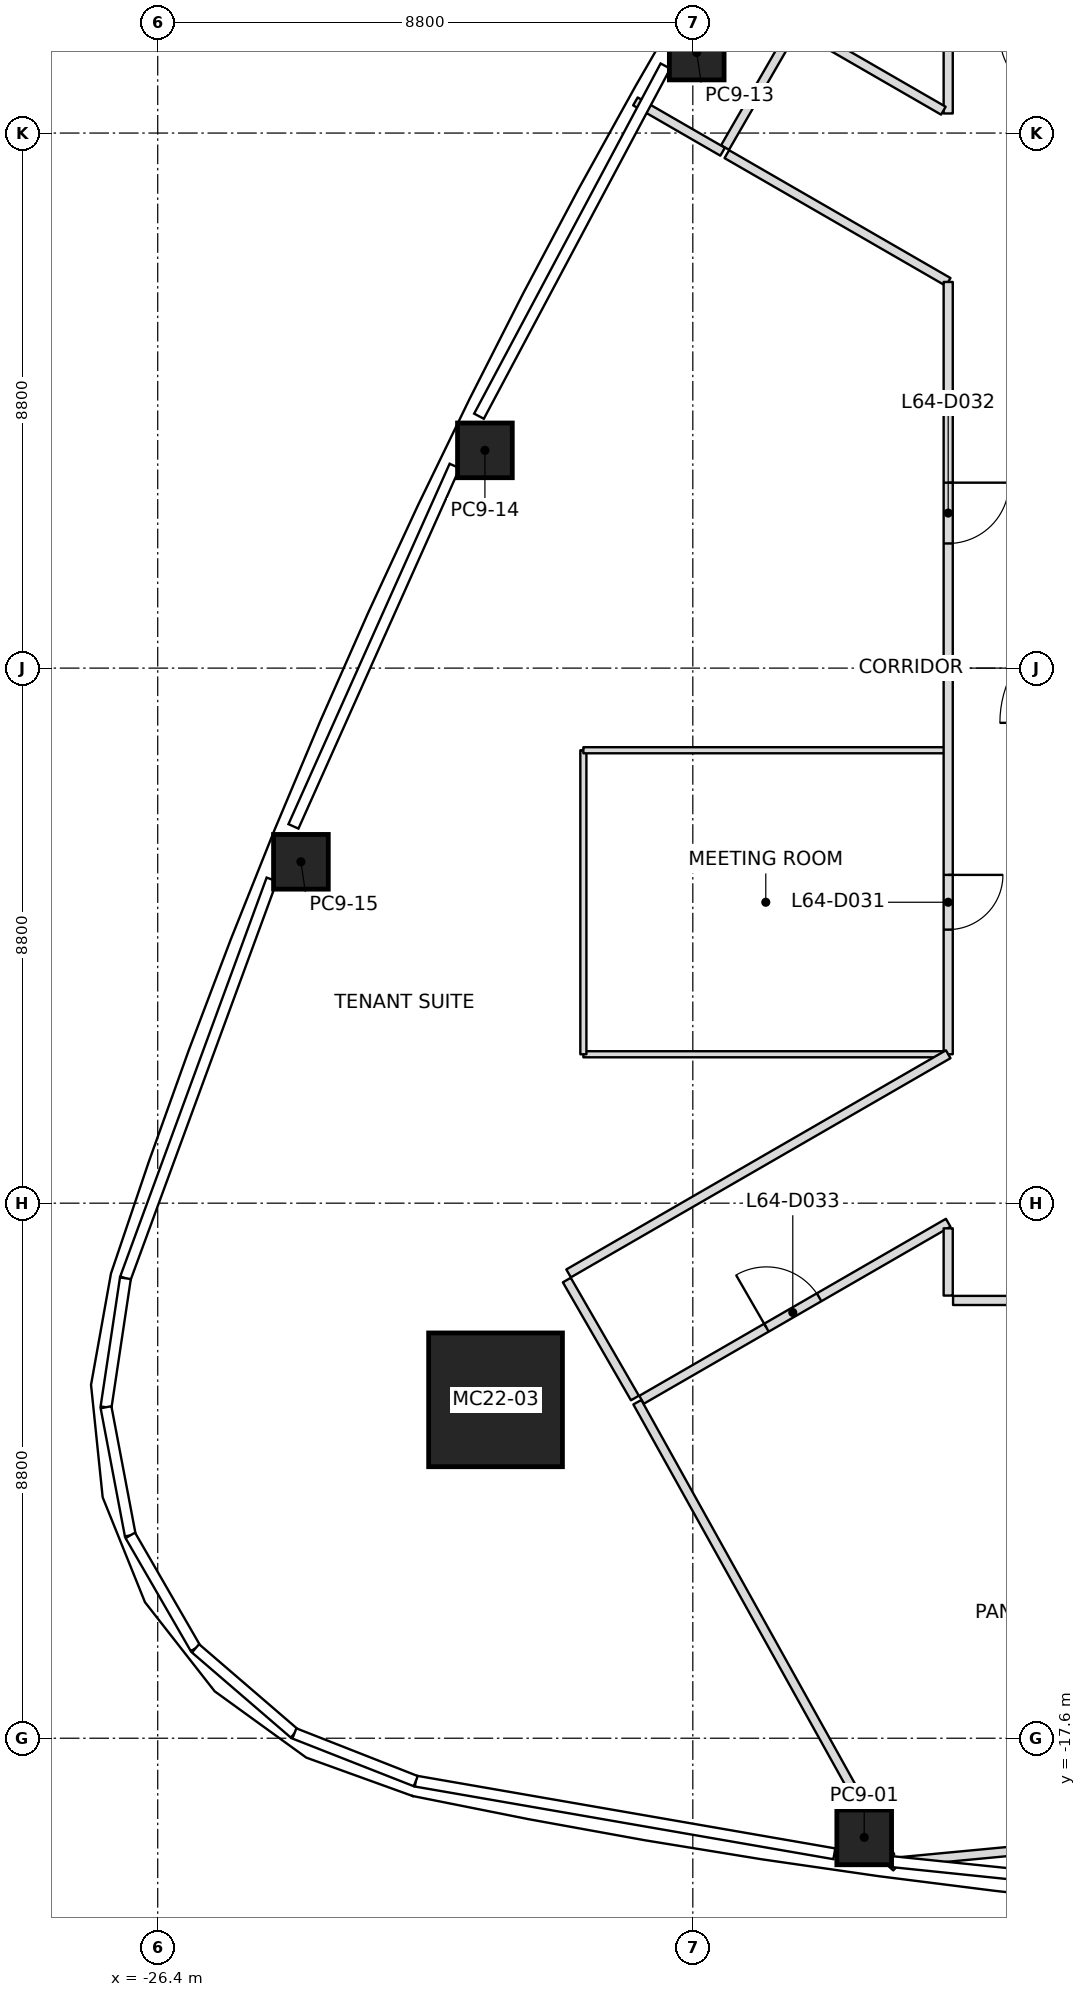
"""IFC4 building model, lengths in metres.
Left out: names, types, materials, properties, quantities, classifications, styles, units other than length and angle.
Written with IfcOpenShell. Run it as: python <this file> out.ifc"""

import sys

from ifc_helpers import new_model, si_unit, direction, frame, frame_2d, origin, origin_2d, place, context, subcontext, project, spatial, rectangle, extrude, element, fill, save


model = new_model("IFC4")
c1 = context("Model", 3, precision=1e-05, world=origin(), true_north=direction((0.0, 1.0)))
c2 = subcontext(c1, "Body", "Model", "MODEL_VIEW")
j1 = project(units=[si_unit("LENGTHUNIT", "METRE"), si_unit("PLANEANGLEUNIT", "RADIAN")], contexts=[c1])
p1 = place(None, origin())
s1 = spatial("IfcSite", under=j1, at=p1, CompositionType="ELEMENT")
p2 = place(p1, origin())
s2 = spatial("IfcBuilding", under=s1, at=p2, CompositionType="ELEMENT")
p3 = place(p2, frame((0.0, 0.0, 283.0)))
s3 = spatial("IfcBuildingStorey", under=s2, at=p3, CompositionType="ELEMENT", Elevation=283.0)
p4 = place(p3, frame((-20.844, -12.034, 0.0), z_axis=(0.027756720281, 0.01604399436, 0.999485945236), x_axis=(0.999614708015, -0.000445500311, -0.027753144871)))
e1 = element("IfcColumn", 1, at=p4, inside=s3, PredefinedType="COLUMN", context=c2, shape_type="SweptSolid", body=[
    extrude(rectangle(XDim=2.2, YDim=2.2, at=origin_2d()), origin(), (0.0, 0.0, 1.0), 4.002),
])
p5 = place(p3, frame((-14.781, -19.231, 0.0), z_axis=(0.017452445502, 0.010434853779, 0.999793241612), x_axis=(-0.990413210435, 0.137223335577, 0.015856505603)))
e2 = element("IfcColumn", 2, at=p5, inside=s3, PredefinedType="COLUMN", context=c2, shape_type="SweptSolid", body=[
    extrude(rectangle(XDim=0.9, YDim=0.9, at=origin_2d()), origin(), (0.0, 0.0, 1.0), 4.001),
])
p6 = place(p3, frame((-17.536, 10.124, 0.0), z_axis=(0.009948074445, -0.005736926367, 0.999934059571), x_axis=(0.499975258342, 0.8660396879, -5.385525e-06)))
e3 = element("IfcColumn", 3, at=p6, inside=s3, PredefinedType="COLUMN", context=c2, shape_type="SweptSolid", body=[
    extrude(rectangle(XDim=0.9, YDim=0.9, at=origin_2d()), origin(), (0.0, 0.0, 1.0), 4.0),
])
p7 = place(p3, frame((-21.019, 3.581, 0.0), z_axis=(0.014036674448, 0.002013957638, 0.999899452818), x_axis=(0.43929078876, 0.898309514635, -0.007976141077)))
e4 = element("IfcColumn", 4, at=p7, inside=s3, PredefinedType="COLUMN", context=c2, shape_type="SweptSolid", body=[
    extrude(rectangle(XDim=0.9, YDim=0.9, at=origin_2d()), origin(), (0.0, 0.0, 1.0), 4.0),
])
p8 = place(p3, frame((-24.045, -3.186, 0.0), z_axis=(0.017757551143, 0.009946669541, 0.999792845115), x_axis=(0.376533551253, 0.92626647535, -0.015902874689)))
e5 = element("IfcColumn", 5, at=p8, inside=s3, PredefinedType="COLUMN", context=c2, shape_type="SweptSolid", body=[
    extrude(rectangle(XDim=0.9, YDim=0.9, at=origin_2d()), origin(), (0.0, 0.0, 1.0), 4.001),
])
p9 = place(p3, frame((-18.512, -12.074, 0.0), z_axis=(0.0, 0.0, 1.0), x_axis=(0.486357878063, -0.873759700631, 0.0)))
e6 = element("IfcWall", 6, at=p9, inside=s3, PredefinedType="PARTITIONING", context=c2, shape_type="SweptSolid", body=[
    extrude(rectangle(XDim=8.551, YDim=0.15, at=frame_2d((4.276, 0.0))), origin(), (0.0, 0.0, 1.0), 3.45),
])
p10 = place(p3, frame((-17.11, 8.493, 0.0), z_axis=(0.0, 0.0, 1.0), x_axis=(-0.86604809764, 0.499960691028, 0.0)))
e7 = element("IfcWall", 7, at=p10, inside=s3, PredefinedType="PARTITIONING", context=c2, shape_type="SweptSolid", body=[
    extrude(rectangle(XDim=1.656, YDim=0.15, at=frame_2d((0.828, 0.0))), origin(), (0.0, 0.0, 1.0), 3.234),
])
p11 = place(p3, frame((-8.2, -19.064, 0.0), z_axis=(0.0, 0.0, 1.0), x_axis=(-0.995555683818, -0.09417473344, 0.0)))
e8 = element("IfcWall", 8, at=p11, inside=s3, PredefinedType="PARTITIONING", context=c2, shape_type="SweptSolid", body=[
    extrude(rectangle(XDim=6.03, YDim=0.15, at=frame_2d((3.015, 0.0))), origin(), (0.0, 0.0, 1.0), 3.234),
])
p12 = place(p3, frame((-14.253, -19.719, 0.0), z_axis=(0.0, 0.0, 1.0), x_axis=(-0.743357981466, 0.668893796794, 0.0)))
e9 = element("IfcWall", 9, at=p12, inside=s3, PredefinedType="PARTITIONING", context=c2, shape_type="SweptSolid", body=[
    extrude(rectangle(XDim=0.19, YDim=0.15, at=frame_2d((0.095, 0.0))), origin(), (0.0, 0.0, 1.0), 3.45),
])
p13 = place(p3, frame((-19.672, -10.064, 0.0), z_axis=(0.0, 0.0, 1.0), x_axis=(0.500030632641, -0.866007717299, 0.0)))
e10 = element("IfcWall", 10, at=p13, inside=s3, PredefinedType="PARTITIONING", context=c2, shape_type="SweptSolid", body=[
    extrude(rectangle(XDim=2.24, YDim=0.15, at=frame_2d((1.12, 0.0))), origin(), (0.0, 0.0, 1.0), 3.233),
])
p14 = place(p3, frame((-17.041, 8.453, 0.0), z_axis=(0.0, 0.0, 1.0), x_axis=(0.866026021477, -0.499998930123, 0.0)))
e11 = element("IfcWall", 11, at=p14, inside=s3, PredefinedType="PARTITIONING", context=c2, shape_type="SweptSolid", body=[
    extrude(rectangle(XDim=4.204, YDim=0.15, at=frame_2d((2.102, 0.0))), origin(), (0.0, 0.0, 1.0), 3.45),
])
p15 = place(p3, frame((-13.4, 6.351, 0.0), z_axis=(0.0, 0.0, 1.0), x_axis=(0.0, -1.0, 0.0)))
e12 = element("IfcWall", 12, at=p15, inside=s3, PredefinedType="PARTITIONING", context=c2, shape_type="SweptSolid", body=[
    extrude(rectangle(XDim=12.702, YDim=0.15, at=frame_2d((6.351, 0.0))), origin(), (0.0, 0.0, 1.0), 3.317),
])
p16 = place(p15, frame((9.752, 0.0, 0.0)))
e13 = element("IfcOpeningElement", 13, at=p16, cuts=e12, PredefinedType="OPENING", context=c2, shape_type="SweptSolid", body=[
    extrude(rectangle(XDim=0.9, YDim=2.1, at=frame_2d((0.45, 1.05))), frame((0.0, 0.075, 0.0), z_axis=(0.0, -1.0, 0.0), x_axis=(1.0, 0.0, 0.0)), (0.0, 0.0, 1.0), 0.15),
])
p17 = place(p15, frame((3.301, 0.0, 0.0)))
e14 = element("IfcOpeningElement", 14, at=p17, cuts=e12, PredefinedType="OPENING", context=c2, shape_type="SweptSolid", body=[
    extrude(rectangle(XDim=1.0, YDim=2.1, at=frame_2d((0.5, 1.05))), frame((0.0, 0.075, 0.0), z_axis=(0.0, -1.0, 0.0), x_axis=(1.0, 0.0, 0.0)), (0.0, 0.0, 1.0), 0.15),
])
p18 = place(p3, frame((-13.4, -6.351, 0.0), z_axis=(0.0, 0.0, 1.0), x_axis=(-0.866040084029, -0.499974572209, 0.0)))
e15 = element("IfcWall", 15, at=p18, inside=s3, PredefinedType="PARTITIONING", context=c2, shape_type="SweptSolid", body=[
    extrude(rectangle(XDim=7.209, YDim=0.15, at=frame_2d((3.604, 0.0))), origin(), (0.0, 0.0, 1.0), 3.317),
])
p19 = place(p3, frame((-18.443, -12.034, 0.0), z_axis=(0.0, 0.0, 1.0), x_axis=(0.866031294818, 0.499989796292, 0.0)))
e16 = element("IfcWall", 16, at=p19, inside=s3, PredefinedType="PARTITIONING", context=c2, shape_type="SweptSolid", body=[
    extrude(rectangle(XDim=5.823, YDim=0.15, at=frame_2d((2.912, 0.0))), origin(), (0.0, 0.0, 1.0), 3.233),
])
p20 = place(p19, frame((2.372, 0.0, 0.0)))
e17 = element("IfcOpeningElement", 17, at=p20, cuts=e16, PredefinedType="OPENING", context=c2, shape_type="SweptSolid", body=[
    extrude(rectangle(XDim=1.0, YDim=2.1, at=frame_2d((0.5, 1.05))), frame((0.0, 0.075, 0.0), z_axis=(0.0, -1.0, 0.0), x_axis=(1.0, 0.0, 0.0)), (0.0, 0.0, 1.0), 0.15),
])
p21 = place(p3, frame((-13.4, -9.214, 0.0), z_axis=(0.0, 0.0, 1.0), x_axis=(0.0, -1.0, 0.0)))
e18 = element("IfcWall", 18, at=p21, inside=s3, PredefinedType="PARTITIONING", context=c2, shape_type="SweptSolid", body=[
    extrude(rectangle(XDim=1.106, YDim=0.15, at=frame_2d((0.553, 0.0))), origin(), (0.0, 0.0, 1.0), 3.233),
])
p22 = place(p3, frame((-15.95, 10.502, 0.0), z_axis=(0.0, 0.0, 1.0), x_axis=(-0.49994888933, -0.866054910533, 0.0)))
e19 = element("IfcWall", 19, at=p22, inside=s3, PredefinedType="PARTITIONING", context=c2, shape_type="SweptSolid", body=[
    extrude(rectangle(XDim=2.24, YDim=0.15, at=frame_2d((1.12, 0.0))), origin(), (0.0, 0.0, 1.0), 3.45),
])
p23 = place(p3, frame((-13.4, 10.32, 0.0), z_axis=(0.0, 0.0, 1.0), x_axis=(0.0, -1.0, 0.0)))
e20 = element("IfcWall", 20, at=p23, inside=s3, PredefinedType="PARTITIONING", context=c2, shape_type="SweptSolid", body=[
    extrude(rectangle(XDim=1.198, YDim=0.15, at=frame_2d((0.599, 0.0))), origin(), (0.0, 0.0, 1.0), 3.45),
])
p24 = place(p3, frame((-13.479, 9.168, 0.0), z_axis=(0.0, 0.0, 1.0), x_axis=(-0.866052895615, 0.499952379729, 0.0)))
e21 = element("IfcWall", 21, at=p24, inside=s3, PredefinedType="PARTITIONING", context=c2, shape_type="SweptSolid", body=[
    extrude(rectangle(XDim=2.727, YDim=0.15, at=frame_2d((1.363, 0.0))), origin(), (0.0, 0.0, 1.0), 3.45),
])
p25 = place(p3, frame((-13.32, -10.4, 0.0), z_axis=(0.0, 0.0, 1.0), x_axis=(1.0, 0.0, 0.0)))
e22 = element("IfcWall", 22, at=p25, inside=s3, PredefinedType="PARTITIONING", context=c2, shape_type="SweptSolid", body=[
    extrude(rectangle(XDim=12.12, YDim=0.15, at=frame_2d((6.06, 0.0))), origin(), (0.0, 0.0, 1.0), 3.393),
])
p26 = place(p3, frame((-13.46, -6.351, 0.0), z_axis=(0.0, 0.0, 1.0), x_axis=(-1.0, 0.0, 0.0)))
e23 = element("IfcWall", 23, at=p26, inside=s3, PredefinedType="PARTITIONING", context=c2, shape_type="SweptSolid", body=[
    extrude(rectangle(XDim=5.94, YDim=0.1, at=frame_2d((2.97, 0.0))), origin(), (0.0, 0.0, 1.0), 3.317),
])
p27 = place(p3, frame((-19.4, -6.351, 0.0), z_axis=(0.0, 0.0, 1.0), x_axis=(0.0, 1.0, 0.0)))
e24 = element("IfcWall", 24, at=p27, inside=s3, PredefinedType="PARTITIONING", context=c2, shape_type="SweptSolid", body=[
    extrude(rectangle(XDim=5.0, YDim=0.1, at=frame_2d((2.5, 0.0))), origin(), (0.0, 0.0, 1.0), 3.317),
])
p28 = place(p3, frame((-19.4, -1.351, 0.0), z_axis=(0.0, 0.0, 1.0), x_axis=(1.0, 0.0, 0.0)))
e25 = element("IfcWall", 25, at=p28, inside=s3, PredefinedType="PARTITIONING", context=c2, shape_type="SweptSolid", body=[
    extrude(rectangle(XDim=5.97, YDim=0.1, at=frame_2d((2.985, 0.0))), origin(), (0.0, 0.0, 1.0), 3.317),
])
p29 = place(p16, origin())
e26 = element("IfcDoor", 26, at=p29, inside=s3, OperationType="SINGLE_SWING_LEFT", PredefinedType="DOOR", context=c2, shape_type="SweptSolid", body=[
    extrude(rectangle(XDim=0.9, YDim=2.1, at=frame_2d((0.45, 1.05))), frame((0.0, 0.025, 0.0), z_axis=(0.0, -1.0, 0.0), x_axis=(1.0, 0.0, 0.0)), (0.0, 0.0, 1.0), 0.05),
])
fill(e13, e26)
p30 = place(p17, origin())
e27 = element("IfcDoor", 27, at=p30, inside=s3, OperationType="SINGLE_SWING_RIGHT", PredefinedType="DOOR", context=c2, shape_type="SweptSolid", body=[
    extrude(rectangle(XDim=1.0, YDim=2.1, at=frame_2d((0.5, 1.05))), frame((0.0, 0.025, 0.0), z_axis=(0.0, -1.0, 0.0), x_axis=(1.0, 0.0, 0.0)), (0.0, 0.0, 1.0), 0.05),
])
fill(e14, e27)
p31 = place(p20, origin())
e28 = element("IfcDoor", 28, at=p31, inside=s3, OperationType="SINGLE_SWING_LEFT", PredefinedType="DOOR", context=c2, shape_type="SweptSolid", body=[
    extrude(rectangle(XDim=1.0, YDim=2.1, at=frame_2d((0.5, 1.05))), frame((0.0, 0.025, 0.0), z_axis=(0.0, -1.0, 0.0), x_axis=(1.0, 0.0, 0.0)), (0.0, 0.0, 1.0), 0.05),
])
fill(e17, e28)
save(model, sys.argv[1])
